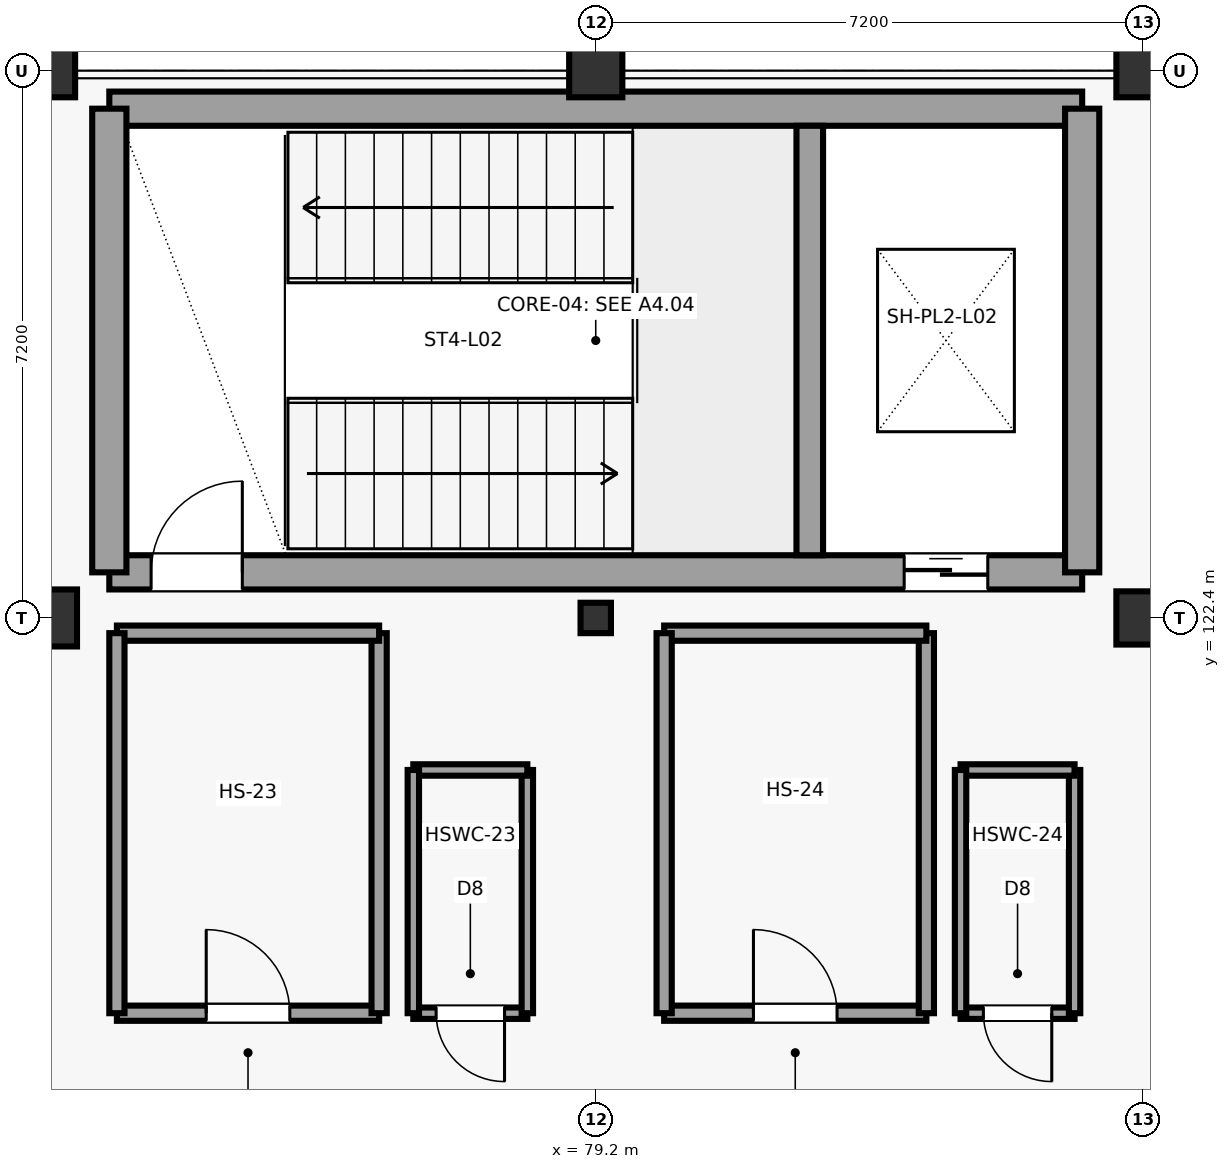
"""IFC4 building model, lengths in metres.
Left out: names, types, materials, properties, quantities, classifications, styles, units other than length and angle.
Written with IfcOpenShell. Run it as: python <this file> out.ifc"""

import sys

from ifc_helpers import new_model, si_unit, direction, frame, frame_2d, origin, origin_2d, place, context, subcontext, project, spatial, rectangle, hollow_rectangle, extrude, element, fill, save


model = new_model("IFC4")
c1 = context("Model", 3, precision=1e-05, world=origin(), true_north=direction((0.0, 1.0)))
c2 = subcontext(c1, "Body", "Model", "MODEL_VIEW")
j1 = project(units=[si_unit("LENGTHUNIT", "METRE"), si_unit("PLANEANGLEUNIT", "RADIAN")], contexts=[c1])
p1 = place(None, origin())
s1 = spatial("IfcSite", under=j1, at=p1, CompositionType="ELEMENT")
p2 = place(p1, origin())
s2 = spatial("IfcBuilding", under=s1, at=p2, CompositionType="ELEMENT")
p3 = place(p2, frame((0.0, 0.0, 9.6)))
s3 = spatial("IfcBuildingStorey", under=s2, at=p3, CompositionType="ELEMENT", Elevation=9.6)
p4 = place(p3, frame((72.0, 122.4, 0.0), z_axis=(0.0, 0.0, 1.0), x_axis=(1.0, 0.0, 0.0)))
e1 = element("IfcColumn", 1, at=p4, inside=s3, PredefinedType="COLUMN", context=c2, shape_type="SweptSolid", body=[
    extrude(rectangle(XDim=0.75, YDim=0.75, at=origin_2d()), origin(), (0.0, 0.0, 1.0), 4.2),
])
p5 = place(p3, frame((72.0, 129.6, 0.0), z_axis=(0.0, 0.0, 1.0), x_axis=(1.0, 0.0, 0.0)))
e2 = element("IfcColumn", 2, at=p5, inside=s3, PredefinedType="COLUMN", context=c2, shape_type="SweptSolid", body=[
    extrude(rectangle(XDim=0.7, YDim=0.7, at=origin_2d()), origin(), (0.0, 0.0, 1.0), 4.2),
])
p6 = place(p3, frame((79.2, 122.4, 0.0), z_axis=(0.0, 0.0, 1.0), x_axis=(1.0, 0.0, 0.0)))
e3 = element("IfcColumn", 3, at=p6, inside=s3, PredefinedType="COLUMN", context=c2, shape_type="SweptSolid", body=[
    extrude(hollow_rectangle(XDim=0.4, YDim=0.4, WallThickness=0.02, at=origin_2d()), origin(), (0.0, 0.0, 1.0), 4.2),
])
for number, where, z_axis, x_axis in (
    (4, (79.2, 129.6, 0.0), (0.0, 0.0, 1.0), (1.0, 0.0, 0.0)),
    (5, (86.4, 122.4, 0.0), (0.0, 0.0, 1.0), (1.0, 0.0, 0.0)),
    (6, (86.4, 129.6, 0.0), (0.0, 0.0, 1.0), (1.0, 0.0, 0.0)),
):
    element("IfcColumn", number, at=place(p3, frame(where, z_axis=z_axis, x_axis=x_axis)), inside=s3, PredefinedType="COLUMN", context=c2, shape_type="SweptSolid", body=[
        extrude(rectangle(XDim=0.7, YDim=0.7, at=origin_2d()), origin(), (0.0, 0.0, 1.0), 4.2),
    ])
p7 = place(p3, frame((72.8, 123.0, 0.0), z_axis=(0.0, 0.0, 1.0), x_axis=(1.0, 0.0, 0.0)))
e7 = element("IfcWall", 7, at=p7, inside=s3, PredefinedType="SHEAR", context=c2, shape_type="SweptSolid", body=[
    extrude(rectangle(XDim=12.8, YDim=0.45, at=frame_2d((6.4, 0.0))), origin(), (0.0, 0.0, 1.0), 3.88),
])
p8 = place(p7, frame((0.55, 0.0, 0.0)))
e8 = element("IfcOpeningElement", 8, at=p8, cuts=e7, PredefinedType="OPENING", context=c2, shape_type="SweptSolid", body=[
    extrude(rectangle(XDim=1.2, YDim=2.25, at=frame_2d((0.6, 1.125))), frame((0.0, 0.235, 0.0), z_axis=(0.0, -1.0, 0.0), x_axis=(1.0, 0.0, 0.0)), (0.0, 0.0, 1.0), 0.47),
])
p9 = place(p7, frame((10.458, 0.0, 0.0)))
e9 = element("IfcOpeningElement", 9, at=p9, cuts=e7, PredefinedType="OPENING", context=c2, shape_type="SweptSolid", body=[
    extrude(rectangle(XDim=1.1, YDim=2.2, at=frame_2d((0.55, 1.1))), frame((0.0, 0.235, 0.0), z_axis=(0.0, -1.0, 0.0), x_axis=(1.0, 0.0, 0.0)), (0.0, 0.0, 1.0), 0.47),
])
p10 = place(p3, frame((72.8, 129.1, 0.0), z_axis=(0.0, 0.0, 1.0), x_axis=(1.0, 0.0, 0.0)))
e10 = element("IfcWall", 10, at=p10, inside=s3, PredefinedType="SHEAR", context=c2, shape_type="SweptSolid", body=[
    extrude(rectangle(XDim=12.8, YDim=0.45, at=frame_2d((6.4, 0.0))), origin(), (0.0, 0.0, 1.0), 3.88),
])
for number, where, z_axis, x_axis in (
    (11, (72.8, 123.0, 0.0), (0.0, 0.0, 1.0), (0.0, 1.0, 0.0)),
    (12, (85.6, 123.0, 0.0), (0.0, 0.0, 1.0), (0.0, 1.0, 0.0)),
):
    element("IfcWall", number, at=place(p3, frame(where, z_axis=z_axis, x_axis=x_axis)), inside=s3, PredefinedType="SHEAR", context=c2, shape_type="SweptSolid", body=[
        extrude(rectangle(XDim=6.1, YDim=0.45, at=frame_2d((3.05, 0.0))), origin(), (0.0, 0.0, 1.0), 3.88),
    ])
p11 = place(p3, frame((82.016, 123.225, 0.0), z_axis=(0.0, 0.0, 1.0), x_axis=(0.0, 1.0, 0.0)))
e13 = element("IfcWall", 13, at=p11, inside=s3, PredefinedType="SHEAR", context=c2, shape_type="SweptSolid", body=[
    extrude(rectangle(XDim=5.65, YDim=0.35, at=frame_2d((2.825, 0.0))), origin(), (0.0, 0.0, 1.0), 3.88),
])
p12 = place(p3, frame((72.9, 117.2, 0.0), z_axis=(0.0, 0.0, 1.0), x_axis=(1.0, 0.0, 0.0)))
e14 = element("IfcWall", 14, at=p12, inside=s3, PredefinedType="PARTITIONING", context=c2, shape_type="SweptSolid", body=[
    extrude(rectangle(XDim=3.45, YDim=0.2, at=frame_2d((1.725, 0.0))), origin(), (0.0, 0.0, 1.0), 2.94),
])
p13 = place(p12, frame((1.175, 0.0, 0.0)))
e15 = element("IfcOpeningElement", 15, at=p13, cuts=e14, PredefinedType="OPENING", context=c2, shape_type="SweptSolid", body=[
    extrude(rectangle(XDim=1.1, YDim=2.25, at=frame_2d((0.55, 1.125))), frame((0.0, 0.11, 0.0), z_axis=(0.0, -1.0, 0.0), x_axis=(1.0, 0.0, 0.0)), (0.0, 0.0, 1.0), 0.22),
])
p14 = place(p3, frame((76.35, 117.2, 0.0), z_axis=(0.0, 0.0, 1.0), x_axis=(0.0, 1.0, 0.0)))
e16 = element("IfcWall", 16, at=p14, inside=s3, PredefinedType="PARTITIONING", context=c2, shape_type="SweptSolid", body=[
    extrude(rectangle(XDim=5.0, YDim=0.2, at=frame_2d((2.5, 0.0))), origin(), (0.0, 0.0, 1.0), 2.94),
])
p15 = place(p3, frame((76.35, 122.2, 0.0), z_axis=(0.0, 0.0, 1.0), x_axis=(-1.0, 0.0, 0.0)))
e17 = element("IfcWall", 17, at=p15, inside=s3, PredefinedType="PARTITIONING", context=c2, shape_type="SweptSolid", body=[
    extrude(rectangle(XDim=3.45, YDim=0.2, at=frame_2d((1.725, 0.0))), origin(), (0.0, 0.0, 1.0), 2.94),
])
p16 = place(p3, frame((72.9, 122.2, 0.0), z_axis=(0.0, 0.0, 1.0), x_axis=(0.0, -1.0, 0.0)))
e18 = element("IfcWall", 18, at=p16, inside=s3, PredefinedType="PARTITIONING", context=c2, shape_type="SweptSolid", body=[
    extrude(rectangle(XDim=5.0, YDim=0.2, at=frame_2d((2.5, 0.0))), origin(), (0.0, 0.0, 1.0), 2.94),
])
p17 = place(p3, frame((76.8, 117.2, 0.0), z_axis=(0.0, 0.0, 1.0), x_axis=(1.0, 0.0, 0.0)))
e19 = element("IfcWall", 19, at=p17, inside=s3, PredefinedType="PARTITIONING", context=c2, shape_type="SweptSolid", body=[
    extrude(rectangle(XDim=1.5, YDim=0.15, at=frame_2d((0.75, 0.0))), origin(), (0.0, 0.0, 1.0), 2.94),
])
p18 = place(p17, frame((0.3, 0.0, 0.0)))
e20 = element("IfcOpeningElement", 20, at=p18, cuts=e19, PredefinedType="OPENING", context=c2, shape_type="SweptSolid", body=[
    extrude(rectangle(XDim=0.9, YDim=2.15, at=frame_2d((0.45, 1.075))), frame((0.0, 0.085, 0.0), z_axis=(0.0, -1.0, 0.0), x_axis=(1.0, 0.0, 0.0)), (0.0, 0.0, 1.0), 0.17),
])
p19 = place(p3, frame((78.3, 117.2, 0.0), z_axis=(0.0, 0.0, 1.0), x_axis=(0.0, 1.0, 0.0)))
e21 = element("IfcWall", 21, at=p19, inside=s3, PredefinedType="PARTITIONING", context=c2, shape_type="SweptSolid", body=[
    extrude(rectangle(XDim=3.2, YDim=0.15, at=frame_2d((1.6, 0.0))), origin(), (0.0, 0.0, 1.0), 2.94),
])
p20 = place(p3, frame((78.3, 120.4, 0.0), z_axis=(0.0, 0.0, 1.0), x_axis=(-1.0, 0.0, 0.0)))
e22 = element("IfcWall", 22, at=p20, inside=s3, PredefinedType="PARTITIONING", context=c2, shape_type="SweptSolid", body=[
    extrude(rectangle(XDim=1.5, YDim=0.15, at=frame_2d((0.75, 0.0))), origin(), (0.0, 0.0, 1.0), 2.94),
])
p21 = place(p3, frame((76.8, 120.4, 0.0), z_axis=(0.0, 0.0, 1.0), x_axis=(0.0, -1.0, 0.0)))
e23 = element("IfcWall", 23, at=p21, inside=s3, PredefinedType="PARTITIONING", context=c2, shape_type="SweptSolid", body=[
    extrude(rectangle(XDim=3.2, YDim=0.15, at=frame_2d((1.6, 0.0))), origin(), (0.0, 0.0, 1.0), 2.94),
])
p22 = place(p3, frame((80.1, 117.2, 0.0), z_axis=(0.0, 0.0, 1.0), x_axis=(1.0, 0.0, 0.0)))
e24 = element("IfcWall", 24, at=p22, inside=s3, PredefinedType="PARTITIONING", context=c2, shape_type="SweptSolid", body=[
    extrude(rectangle(XDim=3.45, YDim=0.2, at=frame_2d((1.725, 0.0))), origin(), (0.0, 0.0, 1.0), 2.94),
])
p23 = place(p22, frame((1.175, 0.0, 0.0)))
e25 = element("IfcOpeningElement", 25, at=p23, cuts=e24, PredefinedType="OPENING", context=c2, shape_type="SweptSolid", body=[
    extrude(rectangle(XDim=1.1, YDim=2.25, at=frame_2d((0.55, 1.125))), frame((0.0, 0.11, 0.0), z_axis=(0.0, -1.0, 0.0), x_axis=(1.0, 0.0, 0.0)), (0.0, 0.0, 1.0), 0.22),
])
p24 = place(p3, frame((83.55, 117.2, 0.0), z_axis=(0.0, 0.0, 1.0), x_axis=(0.0, 1.0, 0.0)))
e26 = element("IfcWall", 26, at=p24, inside=s3, PredefinedType="PARTITIONING", context=c2, shape_type="SweptSolid", body=[
    extrude(rectangle(XDim=5.0, YDim=0.2, at=frame_2d((2.5, 0.0))), origin(), (0.0, 0.0, 1.0), 2.94),
])
p25 = place(p3, frame((83.55, 122.2, 0.0), z_axis=(0.0, 0.0, 1.0), x_axis=(-1.0, 0.0, 0.0)))
e27 = element("IfcWall", 27, at=p25, inside=s3, PredefinedType="PARTITIONING", context=c2, shape_type="SweptSolid", body=[
    extrude(rectangle(XDim=3.45, YDim=0.2, at=frame_2d((1.725, 0.0))), origin(), (0.0, 0.0, 1.0), 2.94),
])
p26 = place(p3, frame((80.1, 122.2, 0.0), z_axis=(0.0, 0.0, 1.0), x_axis=(0.0, -1.0, 0.0)))
e28 = element("IfcWall", 28, at=p26, inside=s3, PredefinedType="PARTITIONING", context=c2, shape_type="SweptSolid", body=[
    extrude(rectangle(XDim=5.0, YDim=0.2, at=frame_2d((2.5, 0.0))), origin(), (0.0, 0.0, 1.0), 2.94),
])
p27 = place(p3, frame((84.0, 117.2, 0.0), z_axis=(0.0, 0.0, 1.0), x_axis=(1.0, 0.0, 0.0)))
e29 = element("IfcWall", 29, at=p27, inside=s3, PredefinedType="PARTITIONING", context=c2, shape_type="SweptSolid", body=[
    extrude(rectangle(XDim=1.5, YDim=0.15, at=frame_2d((0.75, 0.0))), origin(), (0.0, 0.0, 1.0), 2.94),
])
p28 = place(p27, frame((0.3, 0.0, 0.0)))
e30 = element("IfcOpeningElement", 30, at=p28, cuts=e29, PredefinedType="OPENING", context=c2, shape_type="SweptSolid", body=[
    extrude(rectangle(XDim=0.9, YDim=2.15, at=frame_2d((0.45, 1.075))), frame((0.0, 0.085, 0.0), z_axis=(0.0, -1.0, 0.0), x_axis=(1.0, 0.0, 0.0)), (0.0, 0.0, 1.0), 0.17),
])
p29 = place(p3, frame((85.5, 117.2, 0.0), z_axis=(0.0, 0.0, 1.0), x_axis=(0.0, 1.0, 0.0)))
e31 = element("IfcWall", 31, at=p29, inside=s3, PredefinedType="PARTITIONING", context=c2, shape_type="SweptSolid", body=[
    extrude(rectangle(XDim=3.2, YDim=0.15, at=frame_2d((1.6, 0.0))), origin(), (0.0, 0.0, 1.0), 2.94),
])
p30 = place(p3, frame((85.5, 120.4, 0.0), z_axis=(0.0, 0.0, 1.0), x_axis=(-1.0, 0.0, 0.0)))
e32 = element("IfcWall", 32, at=p30, inside=s3, PredefinedType="PARTITIONING", context=c2, shape_type="SweptSolid", body=[
    extrude(rectangle(XDim=1.5, YDim=0.15, at=frame_2d((0.75, 0.0))), origin(), (0.0, 0.0, 1.0), 2.94),
])
p31 = place(p3, frame((84.0, 120.4, 0.0), z_axis=(0.0, 0.0, 1.0), x_axis=(0.0, -1.0, 0.0)))
e33 = element("IfcWall", 33, at=p31, inside=s3, PredefinedType="PARTITIONING", context=c2, shape_type="SweptSolid", body=[
    extrude(rectangle(XDim=3.2, YDim=0.15, at=frame_2d((1.6, 0.0))), origin(), (0.0, 0.0, 1.0), 2.94),
])
p32 = place(p8, origin())
e34 = element("IfcDoor", 34, at=p32, inside=s3, OperationType="SINGLE_SWING_RIGHT", PredefinedType="DOOR", context=c2, shape_type="SweptSolid", body=[
    extrude(rectangle(XDim=1.2, YDim=2.25, at=frame_2d((0.6, 1.125))), frame((0.0, 0.025, 0.0), z_axis=(0.0, -1.0, 0.0), x_axis=(1.0, 0.0, 0.0)), (0.0, 0.0, 1.0), 0.05),
])
fill(e8, e34)
p33 = place(p9, origin())
e35 = element("IfcDoor", 35, at=p33, inside=s3, OperationType="SLIDING_TO_RIGHT", PredefinedType="DOOR", context=c2, shape_type="SweptSolid", body=[
    extrude(rectangle(XDim=1.1, YDim=2.2, at=frame_2d((0.55, 1.1))), frame((0.0, 0.025, 0.0), z_axis=(0.0, -1.0, 0.0), x_axis=(1.0, 0.0, 0.0)), (0.0, 0.0, 1.0), 0.05),
])
fill(e9, e35)
p34 = place(p13, origin())
e36 = element("IfcDoor", 36, at=p34, inside=s3, OperationType="SINGLE_SWING_LEFT", PredefinedType="DOOR", context=c2, shape_type="SweptSolid", body=[
    extrude(rectangle(XDim=1.1, YDim=2.25, at=frame_2d((0.55, 1.125))), frame((0.0, 0.025, 0.0), z_axis=(0.0, -1.0, 0.0), x_axis=(1.0, 0.0, 0.0)), (0.0, 0.0, 1.0), 0.05),
])
fill(e15, e36)
p35 = place(p18, frame((0.9, 0.0, 0.0), z_axis=(0.0, 0.0, 1.0), x_axis=(-1.0, 0.0, 0.0)))
e37 = element("IfcDoor", 37, at=p35, inside=s3, OperationType="SINGLE_SWING_RIGHT", PredefinedType="DOOR", context=c2, shape_type="SweptSolid", body=[
    extrude(rectangle(XDim=0.9, YDim=2.15, at=frame_2d((0.45, 1.075))), frame((0.0, 0.025, 0.0), z_axis=(0.0, -1.0, 0.0), x_axis=(1.0, 0.0, 0.0)), (0.0, 0.0, 1.0), 0.05),
])
fill(e20, e37)
p36 = place(p23, origin())
e38 = element("IfcDoor", 38, at=p36, inside=s3, OperationType="SINGLE_SWING_LEFT", PredefinedType="DOOR", context=c2, shape_type="SweptSolid", body=[
    extrude(rectangle(XDim=1.1, YDim=2.25, at=frame_2d((0.55, 1.125))), frame((0.0, 0.025, 0.0), z_axis=(0.0, -1.0, 0.0), x_axis=(1.0, 0.0, 0.0)), (0.0, 0.0, 1.0), 0.05),
])
fill(e25, e38)
p37 = place(p28, frame((0.9, 0.0, 0.0), z_axis=(0.0, 0.0, 1.0), x_axis=(-1.0, 0.0, 0.0)))
e39 = element("IfcDoor", 39, at=p37, inside=s3, OperationType="SINGLE_SWING_RIGHT", PredefinedType="DOOR", context=c2, shape_type="SweptSolid", body=[
    extrude(rectangle(XDim=0.9, YDim=2.15, at=frame_2d((0.45, 1.075))), frame((0.0, 0.025, 0.0), z_axis=(0.0, -1.0, 0.0), x_axis=(1.0, 0.0, 0.0)), (0.0, 0.0, 1.0), 0.05),
])
fill(e30, e39)
save(model, sys.argv[1])
